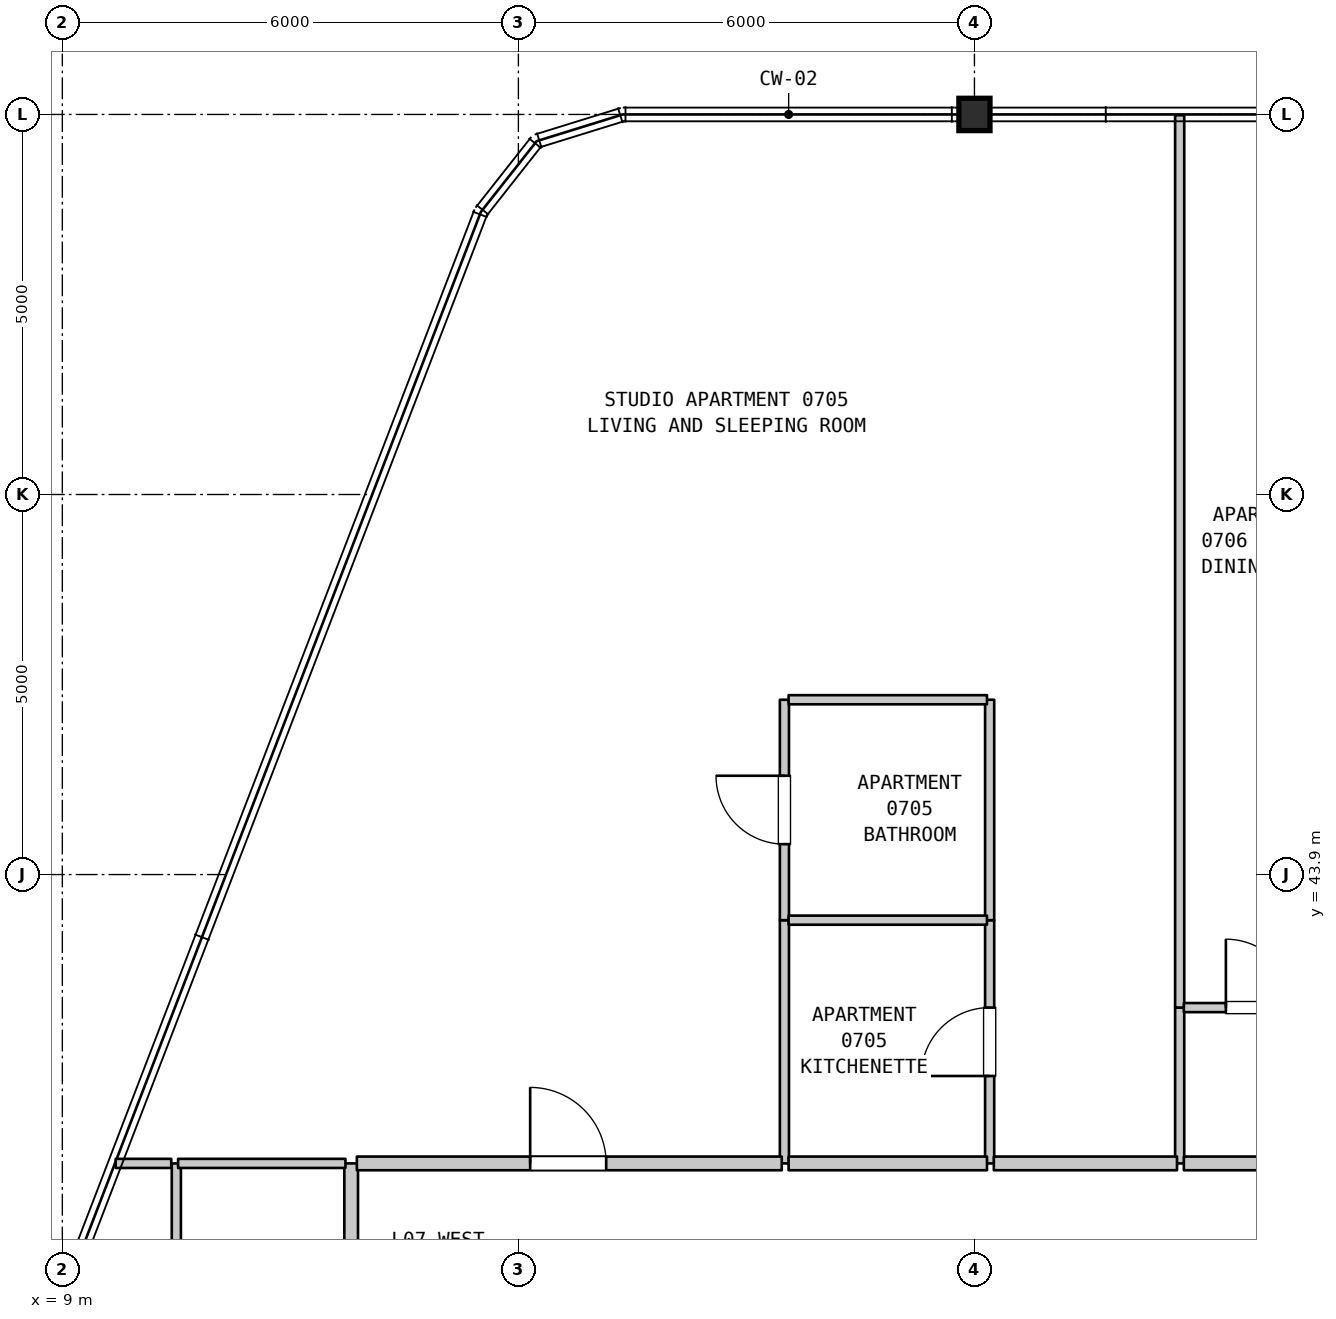
"""IFC4 building model, lengths in metres.
Left out: names, types, materials, properties, quantities, classifications, styles, units other than length and angle.
Written with IfcOpenShell. Run it as: python <this file> out.ifc"""

import sys

from ifc_helpers import new_model, si_unit, direction, frame, frame_2d, origin, origin_2d, place, context, subcontext, project, spatial, rectangle, i_section, extrude, element, fill, save


model = new_model("IFC4")
c1 = context("Model", 3, precision=1e-05, world=origin(), true_north=direction((0.0, 1.0)))
c2 = subcontext(c1, "Body", "Model", "MODEL_VIEW")
j1 = project(units=[si_unit("LENGTHUNIT", "METRE"), si_unit("PLANEANGLEUNIT", "RADIAN")], contexts=[c1])
p1 = place(None, origin())
s1 = spatial("IfcSite", under=j1, at=p1, CompositionType="ELEMENT")
p2 = place(p1, origin())
s2 = spatial("IfcBuilding", under=s1, at=p2, CompositionType="ELEMENT")
p3 = place(p2, frame((0.0, 0.0, 35.1)))
s3 = spatial("IfcBuildingStorey", under=s2, at=p3, CompositionType="ELEMENT", Elevation=35.1)
p4 = place(p3, frame((21.0, 53.9, 0.0), z_axis=(0.0, 0.0, 1.0), x_axis=(1.0, 0.0, 0.0)))
e1 = element("IfcColumn", 1, at=p4, inside=s3, PredefinedType="COLUMN", context=c2, shape_type="SweptSolid", body=[
    extrude(i_section(OverallWidth=0.409, OverallDepth=0.425, WebThickness=0.032, FlangeThickness=0.052, FilletRadius=0.015, at=origin_2d()), origin(), (0.0, 0.0, 1.0), 3.7),
])
p5 = place(p3, frame((10.5, 31.45, 0.0), z_axis=(0.0, 0.0, 1.0), x_axis=(0.0, 1.0, 0.0)))
e2 = element("IfcWall", 2, at=p5, inside=s3, PredefinedType="PARTITIONING", context=c2, shape_type="SweptSolid", body=[
    extrude(rectangle(XDim=8.65, YDim=0.12, at=frame_2d((4.325, 0.0))), origin(), (0.0, 0.0, 1.0), 3.385),
])
p6 = place(p3, frame((12.8, 31.45, 0.0), z_axis=(0.0, 0.0, 1.0), x_axis=(0.0, 1.0, 0.0)))
e3 = element("IfcWall", 3, at=p6, inside=s3, PredefinedType="STANDARD", context=c2, shape_type="SweptSolid", body=[
    extrude(rectangle(XDim=8.65, YDim=0.18, at=frame_2d((4.325, 0.0))), origin(), (0.0, 0.0, 1.0), 3.385),
])
p7 = place(p3, frame((18.5, 40.1, 0.0), z_axis=(0.0, 0.0, 1.0), x_axis=(0.0, 1.0, 0.0)))
e4 = element("IfcWall", 4, at=p7, inside=s3, PredefinedType="PARTITIONING", context=c2, shape_type="SweptSolid", body=[
    extrude(rectangle(XDim=3.2, YDim=0.12, at=frame_2d((1.6, 0.0))), origin(), (0.0, 0.0, 1.0), 3.385),
])
p8 = place(p3, frame((18.5, 43.3, 0.0), z_axis=(0.0, 0.0, 1.0), x_axis=(0.0, 1.0, 0.0)))
e5 = element("IfcWall", 5, at=p8, inside=s3, PredefinedType="PARTITIONING", context=c2, shape_type="SweptSolid", body=[
    extrude(rectangle(XDim=2.9, YDim=0.12, at=frame_2d((1.45, 0.0))), origin(), (0.0, 0.0, 1.0), 3.385),
])
p9 = place(p8, frame((1.0, 0.0, 0.0)))
e6 = element("IfcOpeningElement", 6, at=p9, cuts=e5, PredefinedType="OPENING", context=c2, shape_type="SweptSolid", body=[
    extrude(rectangle(XDim=0.9, YDim=2.1, at=frame_2d((0.45, 1.05))), frame((0.0, 0.07, 0.0), z_axis=(0.0, -1.0, 0.0), x_axis=(1.0, 0.0, 0.0)), (0.0, 0.0, 1.0), 0.14),
])
p10 = place(p3, frame((21.2, 40.1, 0.0), z_axis=(0.0, 0.0, 1.0), x_axis=(0.0, 1.0, 0.0)))
e7 = element("IfcWall", 7, at=p10, inside=s3, PredefinedType="PARTITIONING", context=c2, shape_type="SweptSolid", body=[
    extrude(rectangle(XDim=3.2, YDim=0.12, at=frame_2d((1.6, 0.0))), origin(), (0.0, 0.0, 1.0), 3.385),
])
p11 = place(p10, frame((1.15, 0.0, 0.0)))
e8 = element("IfcOpeningElement", 8, at=p11, cuts=e7, PredefinedType="OPENING", context=c2, shape_type="SweptSolid", body=[
    extrude(rectangle(XDim=0.9, YDim=2.15, at=frame_2d((0.45, 1.075))), frame((0.0, 0.07, 0.0), z_axis=(0.0, -1.0, 0.0), x_axis=(1.0, 0.0, 0.0)), (0.0, 0.0, 1.0), 0.14),
])
p12 = place(p3, frame((21.2, 43.3, 0.0), z_axis=(0.0, 0.0, 1.0), x_axis=(0.0, 1.0, 0.0)))
e9 = element("IfcWall", 9, at=p12, inside=s3, PredefinedType="PARTITIONING", context=c2, shape_type="SweptSolid", body=[
    extrude(rectangle(XDim=2.9, YDim=0.12, at=frame_2d((1.45, 0.0))), origin(), (0.0, 0.0, 1.0), 3.385),
])
p13 = place(p3, frame((23.7, 40.1, 0.0), z_axis=(0.0, 0.0, 1.0), x_axis=(0.0, 1.0, 0.0)))
e10 = element("IfcWall", 10, at=p13, inside=s3, PredefinedType="PARTITIONING", context=c2, shape_type="SweptSolid", body=[
    extrude(rectangle(XDim=2.05, YDim=0.12, at=frame_2d((1.025, 0.0))), origin(), (0.0, 0.0, 1.0), 3.385),
])
p14 = place(p3, frame((23.7, 42.15, 0.0), z_axis=(0.0, 0.0, 1.0), x_axis=(0.0, 1.0, 0.0)))
e11 = element("IfcWall", 11, at=p14, inside=s3, PredefinedType="PARTITIONING", context=c2, shape_type="SweptSolid", body=[
    extrude(rectangle(XDim=11.74, YDim=0.12, at=frame_2d((5.87, 0.0))), origin(), (0.0, 0.0, 1.0), 3.385),
])
p15 = place(p3, frame((9.702, 40.1, 0.0), z_axis=(0.0, 0.0, 1.0), x_axis=(1.0, 0.0, 0.0)))
e12 = element("IfcWall", 12, at=p15, inside=s3, PredefinedType="PARTITIONING", context=c2, shape_type="SweptSolid", body=[
    extrude(rectangle(XDim=0.731, YDim=0.12, at=frame_2d((0.366, 0.0))), origin(), (0.0, 0.0, 1.0), 3.385),
])
p16 = place(p3, frame((10.523, 40.1, 0.0), z_axis=(0.0, 0.0, 1.0), x_axis=(1.0, 0.0, 0.0)))
e13 = element("IfcWall", 13, at=p16, inside=s3, PredefinedType="PARTITIONING", context=c2, shape_type="SweptSolid", body=[
    extrude(rectangle(XDim=2.202, YDim=0.12, at=frame_2d((1.101, 0.0))), origin(), (0.0, 0.0, 1.0), 3.385),
])
p17 = place(p3, frame((12.875, 40.1, 0.0), z_axis=(0.0, 0.0, 1.0), x_axis=(1.0, 0.0, 0.0)))
e14 = element("IfcWall", 14, at=p17, inside=s3, PredefinedType="STANDARD", context=c2, shape_type="SweptSolid", body=[
    extrude(rectangle(XDim=5.59, YDim=0.18, at=frame_2d((2.795, 0.0))), origin(), (0.0, 0.0, 1.0), 3.385),
])
p18 = place(p17, frame((2.28, 0.0, 0.0)))
e15 = element("IfcOpeningElement", 15, at=p18, cuts=e14, PredefinedType="OPENING", context=c2, shape_type="SweptSolid", body=[
    extrude(rectangle(XDim=1.0, YDim=2.15, at=frame_2d((0.5, 1.075))), frame((0.0, 0.1, 0.0), z_axis=(0.0, -1.0, 0.0), x_axis=(1.0, 0.0, 0.0)), (0.0, 0.0, 1.0), 0.2),
])
p19 = place(p3, frame((18.555, 40.1, 0.0), z_axis=(0.0, 0.0, 1.0), x_axis=(1.0, 0.0, 0.0)))
e16 = element("IfcWall", 16, at=p19, inside=s3, PredefinedType="STANDARD", context=c2, shape_type="SweptSolid", body=[
    extrude(rectangle(XDim=2.61, YDim=0.18, at=frame_2d((1.305, 0.0))), origin(), (0.0, 0.0, 1.0), 3.385),
])
p20 = place(p3, frame((21.255, 40.1, 0.0), z_axis=(0.0, 0.0, 1.0), x_axis=(1.0, 0.0, 0.0)))
e17 = element("IfcWall", 17, at=p20, inside=s3, PredefinedType="STANDARD", context=c2, shape_type="SweptSolid", body=[
    extrude(rectangle(XDim=2.41, YDim=0.18, at=frame_2d((1.205, 0.0))), origin(), (0.0, 0.0, 1.0), 3.385),
])
p21 = place(p3, frame((23.755, 40.1, 0.0), z_axis=(0.0, 0.0, 1.0), x_axis=(1.0, 0.0, 0.0)))
e18 = element("IfcWall", 18, at=p21, inside=s3, PredefinedType="STANDARD", context=c2, shape_type="SweptSolid", body=[
    extrude(rectangle(XDim=5.095, YDim=0.18, at=frame_2d((2.548, 0.0))), origin(), (0.0, 0.0, 1.0), 3.385),
])
p22 = place(p21, frame((2.08, 0.0, 0.0)))
e19 = element("IfcOpeningElement", 19, at=p22, cuts=e18, PredefinedType="OPENING", context=c2, shape_type="SweptSolid", body=[
    extrude(rectangle(XDim=1.0, YDim=2.15, at=frame_2d((0.5, 1.075))), frame((0.0, 0.1, 0.0), z_axis=(0.0, -1.0, 0.0), x_axis=(1.0, 0.0, 0.0)), (0.0, 0.0, 1.0), 0.2),
])
p23 = place(p3, frame((23.755, 42.15, 0.0), z_axis=(0.0, 0.0, 1.0), x_axis=(1.0, 0.0, 0.0)))
e20 = element("IfcWall", 20, at=p23, inside=s3, PredefinedType="PARTITIONING", context=c2, shape_type="SweptSolid", body=[
    extrude(rectangle(XDim=2.16, YDim=0.12, at=frame_2d((1.08, 0.0))), origin(), (0.0, 0.0, 1.0), 3.385),
])
p24 = place(p23, frame((0.553, 0.0, 0.0)))
e21 = element("IfcOpeningElement", 21, at=p24, cuts=e20, PredefinedType="OPENING", context=c2, shape_type="SweptSolid", body=[
    extrude(rectangle(XDim=0.9, YDim=2.15, at=frame_2d((0.45, 1.075))), frame((0.0, 0.07, 0.0), z_axis=(0.0, -1.0, 0.0), x_axis=(1.0, 0.0, 0.0)), (0.0, 0.0, 1.0), 0.14),
])
for number, where, z_axis, x_axis in (
    (22, (18.555, 43.3, 0.0), (0.0, 0.0, 1.0), (1.0, 0.0, 0.0)),
    (23, (18.555, 46.2, 0.0), (0.0, 0.0, 1.0), (1.0, 0.0, 0.0)),
):
    element("IfcWall", number, at=place(p3, frame(where, z_axis=z_axis, x_axis=x_axis)), inside=s3, PredefinedType="PARTITIONING", context=c2, shape_type="SweptSolid", body=[
        extrude(rectangle(XDim=2.61, YDim=0.12, at=frame_2d((1.305, 0.0))), origin(), (0.0, 0.0, 1.0), 3.385),
    ])
p25 = place(p9, origin())
e24 = element("IfcDoor", 24, at=p25, inside=s3, OperationType="SINGLE_SWING_RIGHT", PredefinedType="DOOR", context=c2, shape_type="SweptSolid", body=[
    extrude(rectangle(XDim=0.9, YDim=2.1, at=frame_2d((0.45, 1.05))), frame((0.0, 0.025, 0.0), z_axis=(0.0, -1.0, 0.0), x_axis=(1.0, 0.0, 0.0)), (0.0, 0.0, 1.0), 0.05),
])
fill(e6, e24)
p26 = place(p11, origin())
e25 = element("IfcDoor", 25, at=p26, inside=s3, OperationType="SINGLE_SWING_LEFT", PredefinedType="DOOR", context=c2, shape_type="SweptSolid", body=[
    extrude(rectangle(XDim=0.9, YDim=2.15, at=frame_2d((0.45, 1.075))), frame((0.0, 0.025, 0.0), z_axis=(0.0, -1.0, 0.0), x_axis=(1.0, 0.0, 0.0)), (0.0, 0.0, 1.0), 0.05),
])
fill(e8, e25)
p27 = place(p18, origin())
e26 = element("IfcDoor", 26, at=p27, inside=s3, OperationType="SINGLE_SWING_LEFT", PredefinedType="DOOR", context=c2, shape_type="SweptSolid", body=[
    extrude(rectangle(XDim=1.0, YDim=2.15, at=frame_2d((0.5, 1.075))), frame((0.0, 0.025, 0.0), z_axis=(0.0, -1.0, 0.0), x_axis=(1.0, 0.0, 0.0)), (0.0, 0.0, 1.0), 0.05),
])
fill(e15, e26)
p28 = place(p24, origin())
e27 = element("IfcDoor", 27, at=p28, inside=s3, OperationType="SINGLE_SWING_LEFT", PredefinedType="DOOR", context=c2, shape_type="SweptSolid", body=[
    extrude(rectangle(XDim=0.9, YDim=2.15, at=frame_2d((0.45, 1.075))), frame((0.0, 0.025, 0.0), z_axis=(0.0, -1.0, 0.0), x_axis=(1.0, 0.0, 0.0)), (0.0, 0.0, 1.0), 0.05),
])
fill(e21, e27)
save(model, sys.argv[1])
